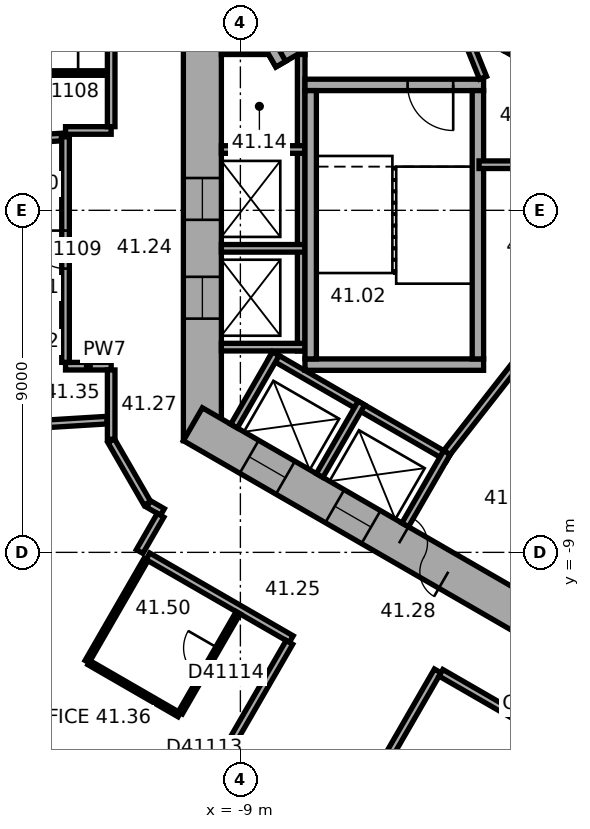
"""IFC4 building model, lengths in metres.
Left out: names, types, materials, properties, quantities, classifications, styles, units other than length and angle.
Written with IfcOpenShell. Run it as: python <this file> out.ifc"""

import sys

from ifc_helpers import new_model, si_unit, direction, frame, frame_2d, origin, place, context, subcontext, project, spatial, rectangle, extrude, element, fill, save


model = new_model("IFC4")
c1 = context("Model", 3, precision=1e-05, world=origin(), true_north=direction((0.0, 1.0)))
c2 = subcontext(c1, "Body", "Model", "MODEL_VIEW")
j1 = project(units=[si_unit("LENGTHUNIT", "METRE"), si_unit("PLANEANGLEUNIT", "RADIAN")], contexts=[c1])
p1 = place(None, origin())
s1 = spatial("IfcSite", under=j1, at=p1, CompositionType="ELEMENT")
p2 = place(p1, origin())
s2 = spatial("IfcBuilding", under=s1, at=p2, CompositionType="ELEMENT")
p3 = place(p2, frame((0.0, 0.0, 168.8)))
s3 = spatial("IfcBuildingStorey", under=s2, at=p3, CompositionType="ELEMENT", Elevation=168.8)
p4 = place(p3, frame((-10.0, 6.062, 0.0), z_axis=(0.0, 0.0, 1.0), x_axis=(0.0, -1.0, 0.0)))
e1 = element("IfcWall", 1, at=p4, inside=s3, PredefinedType="SHEAR", context=c2, shape_type="SweptSolid", body=[
    extrude(rectangle(XDim=12.125, YDim=1.0, at=frame_2d((6.062, 0.0))), origin(), (0.0, 0.0, 1.0), 3.7),
])
p5 = place(p4, frame((5.212, 0.0, 0.0)))
e2 = element("IfcOpeningElement", 2, at=p5, cuts=e1, PredefinedType="OPENING", context=c2, shape_type="SweptSolid", body=[
    extrude(rectangle(XDim=1.1, YDim=2.1, at=frame_2d((0.55, 1.05))), frame((0.0, 0.51, 0.0), z_axis=(0.0, -1.0, 0.0), x_axis=(1.0, 0.0, 0.0)), (0.0, 0.0, 1.0), 1.02),
])
p6 = place(p4, frame((7.812, 0.0, 0.0)))
e3 = element("IfcOpeningElement", 3, at=p6, cuts=e1, PredefinedType="OPENING", context=c2, shape_type="SweptSolid", body=[
    extrude(rectangle(XDim=1.1, YDim=2.1, at=frame_2d((0.55, 1.05))), frame((0.0, 0.51, 0.0), z_axis=(0.0, -1.0, 0.0), x_axis=(1.0, 0.0, 0.0)), (0.0, 0.0, 1.0), 1.02),
])
p7 = place(p3, frame((-10.25, -5.629, 0.0), z_axis=(0.0, 0.0, 1.0), x_axis=(0.866022616891, -0.50000482701, 0.0)))
e4 = element("IfcWall", 4, at=p7, inside=s3, PredefinedType="SHEAR", context=c2, shape_type="SweptSolid", body=[
    extrude(rectangle(XDim=12.125, YDim=1.0, at=frame_2d((6.062, 0.0))), origin(), (0.0, 0.0, 1.0), 3.7),
])
p8 = place(p7, frame((6.262, 0.0, 0.0)))
e5 = element("IfcOpeningElement", 5, at=p8, cuts=e4, PredefinedType="OPENING", context=c2, shape_type="SweptSolid", body=[
    extrude(rectangle(XDim=1.5, YDim=2.1, at=frame_2d((0.75, 1.05))), frame((0.0, 0.51, 0.0), z_axis=(0.0, -1.0, 0.0), x_axis=(1.0, 0.0, 0.0)), (0.0, 0.0, 1.0), 1.02),
])
p9 = place(p7, frame((1.712, 0.0, 0.0)))
e6 = element("IfcOpeningElement", 6, at=p9, cuts=e4, PredefinedType="OPENING", context=c2, shape_type="SweptSolid", body=[
    extrude(rectangle(XDim=1.1, YDim=2.1, at=frame_2d((0.55, 1.05))), frame((0.0, 0.51, 0.0), z_axis=(0.0, -1.0, 0.0), x_axis=(1.0, 0.0, 0.0)), (0.0, 0.0, 1.0), 1.02),
])
p10 = place(p7, frame((4.312, 0.0, 0.0)))
e7 = element("IfcOpeningElement", 7, at=p10, cuts=e4, PredefinedType="OPENING", context=c2, shape_type="SweptSolid", body=[
    extrude(rectangle(XDim=1.1, YDim=2.1, at=frame_2d((0.55, 1.05))), frame((0.0, 0.51, 0.0), z_axis=(0.0, -1.0, 0.0), x_axis=(1.0, 0.0, 0.0)), (0.0, 0.0, 1.0), 1.02),
])
p11 = place(p3, frame((-18.789, -14.267, 0.0), z_axis=(0.0, 0.0, 1.0), x_axis=(0.866023315909, -0.500003616288, 0.0)))
e8 = element("IfcWall", 8, at=p11, inside=s3, PredefinedType="STANDARD", context=c2, shape_type="SweptSolid", body=[
    extrude(rectangle(XDim=20.044, YDim=0.2, at=frame_2d((10.022, 0.0))), origin(), (0.0, 0.0, 1.0), 3.7),
])
p12 = place(p11, frame((1.314, 0.0, 0.9)))
e9 = element("IfcOpeningElement", 9, at=p12, cuts=e8, PredefinedType="OPENING", context=c2, shape_type="SweptSolid", body=[
    extrude(rectangle(XDim=2.4, YDim=2.0, at=frame_2d((1.2, 1.0))), frame((0.0, 0.11, 0.0), z_axis=(0.0, -1.0, 0.0), x_axis=(1.0, 0.0, 0.0)), (0.0, 0.0, 1.0), 0.22),
])
p13 = place(p11, frame((5.069, 0.0, 0.9)))
e10 = element("IfcOpeningElement", 10, at=p13, cuts=e8, PredefinedType="OPENING", context=c2, shape_type="SweptSolid", body=[
    extrude(rectangle(XDim=2.4, YDim=2.0, at=frame_2d((1.2, 1.0))), frame((0.0, 0.11, 0.0), z_axis=(0.0, -1.0, 0.0), x_axis=(1.0, 0.0, 0.0)), (0.0, 0.0, 1.0), 0.22),
])
p14 = place(p11, frame((8.823, 0.0, 0.9)))
e11 = element("IfcOpeningElement", 11, at=p14, cuts=e8, PredefinedType="OPENING", context=c2, shape_type="SweptSolid", body=[
    extrude(rectangle(XDim=2.4, YDim=2.0, at=frame_2d((1.2, 1.0))), frame((0.0, 0.11, 0.0), z_axis=(0.0, -1.0, 0.0), x_axis=(1.0, 0.0, 0.0)), (0.0, 0.0, 1.0), 0.22),
])
p15 = place(p11, frame((12.577, 0.0, 0.9)))
e12 = element("IfcOpeningElement", 12, at=p15, cuts=e8, PredefinedType="OPENING", context=c2, shape_type="SweptSolid", body=[
    extrude(rectangle(XDim=2.4, YDim=2.0, at=frame_2d((1.2, 1.0))), frame((0.0, 0.11, 0.0), z_axis=(0.0, -1.0, 0.0), x_axis=(1.0, 0.0, 0.0)), (0.0, 0.0, 1.0), 0.22),
])
p16 = place(p11, frame((16.331, 0.0, 0.9)))
e13 = element("IfcOpeningElement", 13, at=p16, cuts=e8, PredefinedType="OPENING", context=c2, shape_type="SweptSolid", body=[
    extrude(rectangle(XDim=2.4, YDim=2.0, at=frame_2d((1.2, 1.0))), frame((0.0, 0.11, 0.0), z_axis=(0.0, -1.0, 0.0), x_axis=(1.0, 0.0, 0.0)), (0.0, 0.0, 1.0), 0.22),
])
p17 = place(p3, frame((-7.4, 4.3, 0.0), z_axis=(0.0, 0.0, 1.0), x_axis=(0.0, -1.0, 0.0)))
e14 = element("IfcWall", 14, at=p17, inside=s3, PredefinedType="PARTITIONING", context=c2, shape_type="SweptSolid", body=[
    extrude(rectangle(XDim=8.0, YDim=0.2, at=frame_2d((4.0, 0.0))), origin(), (0.0, 0.0, 1.0), 3.42),
])
for number, where, z_axis, x_axis in (
    (15, (-7.3, 4.2, 0.0), (0.0, 0.0, 1.0), (-1.0, 0.0, 0.0)),
    (16, (-7.3, 1.6, 0.0), (0.0, 0.0, 1.0), (-1.0, 0.0, 0.0)),
    (17, (-7.3, -1.0, 0.0), (0.0, 0.0, 1.0), (-1.0, 0.0, 0.0)),
    (18, (-7.3, -3.6, 0.0), (0.0, 0.0, 1.0), (-1.0, 0.0, 0.0)),
):
    element("IfcWall", number, at=place(p3, frame(where, z_axis=z_axis, x_axis=x_axis)), inside=s3, PredefinedType="PARTITIONING", context=c2, shape_type="SweptSolid", body=[
        extrude(rectangle(XDim=2.2, YDim=0.2, at=frame_2d((1.1, 0.0))), origin(), (0.0, 0.0, 1.0), 3.42),
    ])
p18 = place(p3, frame((-8.203, -3.809, 0.0), z_axis=(0.0, 0.0, 1.0), x_axis=(0.866028230842, -0.499995103361, 0.0)))
e19 = element("IfcWall", 19, at=p18, inside=s3, PredefinedType="PARTITIONING", context=c2, shape_type="SweptSolid", body=[
    extrude(rectangle(XDim=5.4, YDim=0.2, at=frame_2d((2.7, 0.0))), origin(), (0.0, 0.0, 1.0), 3.42),
])
for number, where, z_axis, x_axis in (
    (20, (-8.067, -3.772, 0.0), (0.0, 0.0, 1.0), (-0.5, -0.866, 0.0)),
    (21, (-5.815, -5.072, 0.0), (0.0, 0.0, 1.0), (-0.5, -0.866, 0.0)),
):
    element("IfcWall", number, at=place(p3, frame(where, z_axis=z_axis, x_axis=x_axis)), inside=s3, PredefinedType="PARTITIONING", context=c2, shape_type="SweptSolid", body=[
        extrude(rectangle(XDim=2.2, YDim=0.2, at=frame_2d((1.1, 0.0))), origin(), (0.0, 0.0, 1.0), 3.42),
    ])
p19 = place(p3, frame((-3.563, -6.372, 0.0), z_axis=(0.0, 0.0, 1.0), x_axis=(-0.499994660107, -0.866028486751, 0.0)))
e22 = element("IfcWall", 22, at=p19, inside=s3, PredefinedType="PARTITIONING", context=c2, shape_type="SweptSolid", body=[
    extrude(rectangle(XDim=2.2, YDim=0.2, at=frame_2d((1.1, 0.0))), origin(), (0.0, 0.0, 1.0), 3.42),
])
p20 = place(p3, frame((4.103, 0.807, 0.0), z_axis=(0.0, 0.0, 1.0), x_axis=(-0.866027801685, 0.499995846692, 0.0)))
e23 = element("IfcWall", 23, at=p20, inside=s3, PredefinedType="SHEAR", context=c2, shape_type="SweptSolid", body=[
    extrude(rectangle(XDim=7.06, YDim=0.3, at=frame_2d((3.53, 0.0))), origin(), (0.0, 0.0, 1.0), 3.42),
])
p21 = place(p3, frame((-2.6, 3.3, 0.0), z_axis=(0.0, 0.0, 1.0), x_axis=(-1.0, 0.0, 0.0)))
e24 = element("IfcWall", 24, at=p21, inside=s3, PredefinedType="SHEAR", context=c2, shape_type="SweptSolid", body=[
    extrude(rectangle(XDim=4.7, YDim=0.3, at=frame_2d((2.35, 0.0))), origin(), (0.0, 0.0, 1.0), 3.42),
])
p22 = place(p21, frame((0.8, 0.0, 0.0)))
e25 = element("IfcOpeningElement", 25, at=p22, cuts=e24, PredefinedType="OPENING", context=c2, shape_type="SweptSolid", body=[
    extrude(rectangle(XDim=1.2, YDim=2.1, at=frame_2d((0.6, 1.05))), frame((0.0, 0.16, 0.0), z_axis=(0.0, -1.0, 0.0), x_axis=(1.0, 0.0, 0.0)), (0.0, 0.0, 1.0), 0.32),
])
p23 = place(p3, frame((-2.6, -4.06, 0.0), z_axis=(0.0, 0.0, 1.0), x_axis=(-1.0, 0.0, 0.0)))
e26 = element("IfcWall", 26, at=p23, inside=s3, PredefinedType="SHEAR", context=c2, shape_type="SweptSolid", body=[
    extrude(rectangle(XDim=4.7, YDim=0.3, at=frame_2d((2.35, 0.0))), origin(), (0.0, 0.0, 1.0), 3.42),
])
for number, where, z_axis, x_axis in (
    (27, (-2.75, 3.15, 0.0), (0.0, 0.0, 1.0), (0.0, -1.0, 0.0)),
    (28, (-7.15, 3.15, 0.0), (0.0, 0.0, 1.0), (0.0, -1.0, 0.0)),
):
    element("IfcWall", number, at=place(p3, frame(where, z_axis=z_axis, x_axis=x_axis)), inside=s3, PredefinedType="SHEAR", context=c2, shape_type="SweptSolid", body=[
        extrude(rectangle(XDim=7.06, YDim=0.3, at=frame_2d((3.53, 0.0))), origin(), (0.0, 0.0, 1.0), 3.42),
    ])
p24 = place(p3, frame((-5.24, 5.577, 0.0), z_axis=(0.0, 0.0, 1.0), x_axis=(-0.866014461049, -0.500018952895, 0.0)))
e29 = element("IfcWall", 29, at=p24, inside=s3, PredefinedType="SHEAR", context=c2, shape_type="SweptSolid", body=[
    extrude(rectangle(XDim=3.35, YDim=0.3, at=frame_2d((1.675, 0.0))), origin(), (0.0, 0.0, 1.0), 3.42),
])
p25 = place(p3, frame((-7.937, 3.847, 0.0), z_axis=(0.0, 0.0, 1.0), x_axis=(-0.50002983664, 0.866008176907, 0.0)))
e30 = element("IfcWall", 30, at=p25, inside=s3, PredefinedType="SHEAR", context=c2, shape_type="SweptSolid", body=[
    extrude(rectangle(XDim=2.2, YDim=0.3, at=frame_2d((1.1, 0.0))), origin(), (0.0, 0.0, 1.0), 3.42),
])
p26 = place(p3, frame((-2.615, 3.487, 0.0), z_axis=(0.0, 0.0, 1.0), x_axis=(-0.373576831041, 0.92759924068, 0.0)))
e31 = element("IfcWall", 31, at=p26, inside=s3, PredefinedType="PARTITIONING", context=c2, shape_type="SweptSolid", body=[
    extrude(rectangle(XDim=3.002, YDim=0.2, at=frame_2d((1.501, 0.0))), origin(), (0.0, 0.0, 1.0), 3.42),
])
p27 = place(p26, frame((1.15, 0.0, 0.0)))
e32 = element("IfcOpeningElement", 32, at=p27, cuts=e31, PredefinedType="OPENING", context=c2, shape_type="SweptSolid", body=[
    extrude(rectangle(XDim=0.9, YDim=2.1, at=frame_2d((0.45, 1.05))), frame((0.0, 0.11, 0.0), z_axis=(0.0, -1.0, 0.0), x_axis=(1.0, 0.0, 0.0)), (0.0, 0.0, 1.0), 0.22),
])
p28 = place(p3, frame((-1.712, -4.008, 0.0), z_axis=(0.0, 0.0, 1.0), x_axis=(-0.616549420702, -0.787316208287, 0.0)))
e33 = element("IfcWall", 33, at=p28, inside=s3, PredefinedType="PARTITIONING", context=c2, shape_type="SweptSolid", body=[
    extrude(rectangle(XDim=3.002, YDim=0.2, at=frame_2d((1.501, 0.0))), origin(), (0.0, 0.0, 1.0), 3.42),
])
p29 = place(p3, frame((-2.72, 1.2, 0.0), z_axis=(0.0, 0.0, 1.0), x_axis=(1.0, 0.0, 0.0)))
e34 = element("IfcWall", 34, at=p29, inside=s3, PredefinedType="PARTITIONING", context=c2, shape_type="SweptSolid", body=[
    extrude(rectangle(XDim=5.961, YDim=0.2, at=frame_2d((2.981, 0.0))), origin(), (0.0, 0.0, 1.0), 3.42),
])
p30 = place(p3, frame((-20.88, 1.49, 0.0), z_axis=(0.0, 0.0, 1.0), x_axis=(0.998134881975, 0.061047173439, 0.0)))
e35 = element("IfcWall", 35, at=p30, inside=s3, PredefinedType="PARTITIONING", context=c2, shape_type="SweptSolid", body=[
    extrude(rectangle(XDim=7.183, YDim=0.2, at=frame_2d((3.591, 0.0))), origin(), (0.0, 0.0, 1.0), 2.87),
])
p31 = place(p3, frame((-20.421, -6.005, 0.0), z_axis=(0.0, 0.0, 1.0), x_axis=(0.998134865741, 0.061047438866, 0.0)))
e36 = element("IfcWall", 36, at=p31, inside=s3, PredefinedType="PARTITIONING", context=c2, shape_type="SweptSolid", body=[
    extrude(rectangle(XDim=7.927, YDim=0.2, at=frame_2d((3.963, 0.0))), origin(), (0.0, 0.0, 1.0), 2.87),
])
p32 = place(p3, frame((-13.601, -4.101, 0.0), z_axis=(0.0, 0.0, 1.0), x_axis=(1.0, 0.0, 0.0)))
e37 = element("IfcWall", 37, at=p32, inside=s3, PredefinedType="PARTITIONING", context=c2, shape_type="SweptSolid", body=[
    extrude(rectangle(XDim=1.201, YDim=0.2, at=frame_2d((0.601, 0.0))), origin(), (0.0, 0.0, 1.0), 3.42),
])
p33 = place(p3, frame((-13.601, 1.935, 0.0), z_axis=(0.0, 0.0, 1.0), x_axis=(0.0, -1.0, 0.0)))
e38 = element("IfcWall", 38, at=p33, inside=s3, PredefinedType="PARTITIONING", context=c2, shape_type="SweptSolid", body=[
    extrude(rectangle(XDim=5.936, YDim=0.2, at=frame_2d((2.968, 0.0))), origin(), (0.0, 0.0, 1.0), 3.42),
])
p34 = place(p33, frame((2.468, 0.0, 0.0)))
e39 = element("IfcOpeningElement", 39, at=p34, cuts=e38, PredefinedType="OPENING", context=c2, shape_type="SweptSolid", body=[
    extrude(rectangle(XDim=1.0, YDim=2.1, at=frame_2d((0.5, 1.05))), frame((0.0, 0.11, 0.0), z_axis=(0.0, -1.0, 0.0), x_axis=(1.0, 0.0, 0.0)), (0.0, 0.0, 1.0), 0.22),
])
p35 = place(p3, frame((-13.035, -11.875, 0.0), z_axis=(0.0, 0.0, 1.0), x_axis=(0.500026960575, 0.86600983753, 0.0)))
e40 = element("IfcWall", 40, at=p35, inside=s3, PredefinedType="PARTITIONING", context=c2, shape_type="SweptSolid", body=[
    extrude(rectangle(XDim=3.1, YDim=0.12, at=frame_2d((1.55, 0.0))), origin(), (0.0, 0.0, 1.0), 3.42),
])
p36 = place(p3, frame((-12.5, 3.612, 0.0), z_axis=(0.0, 0.0, 1.0), x_axis=(-1.0, 0.0, 0.0)))
e41 = element("IfcWall", 41, at=p36, inside=s3, PredefinedType="PARTITIONING", context=c2, shape_type="SweptSolid", body=[
    extrude(rectangle(XDim=2.44, YDim=0.12, at=frame_2d((1.22, 0.0))), origin(), (0.0, 0.0, 1.0), 3.42),
])
p37 = place(p36, frame((0.77, 0.0, 0.0)))
e42 = element("IfcOpeningElement", 42, at=p37, cuts=e41, PredefinedType="OPENING", context=c2, shape_type="SweptSolid", body=[
    extrude(rectangle(XDim=0.9, YDim=2.1, at=frame_2d((0.45, 1.05))), frame((0.0, 0.07, 0.0), z_axis=(0.0, -1.0, 0.0), x_axis=(1.0, 0.0, 0.0)), (0.0, 0.0, 1.0), 0.14),
])
p38 = place(p3, frame((-12.4, -6.062, 0.0), z_axis=(0.0, 0.0, 1.0), x_axis=(0.500022797313, -0.86601224135, 0.0)))
e43 = element("IfcWall", 43, at=p38, inside=s3, PredefinedType="PARTITIONING", context=c2, shape_type="SweptSolid", body=[
    extrude(rectangle(XDim=1.9, YDim=0.2, at=frame_2d((0.95, 0.0))), origin(), (0.0, 0.0, 1.0), 3.42),
])
p39 = place(p3, frame((-12.4, -4.201, 0.0), z_axis=(0.0, 0.0, 1.0), x_axis=(0.0, -1.0, 0.0)))
e44 = element("IfcWall", 44, at=p39, inside=s3, PredefinedType="PARTITIONING", context=c2, shape_type="SweptSolid", body=[
    extrude(rectangle(XDim=1.821, YDim=0.2, at=frame_2d((0.911, 0.0))), origin(), (0.0, 0.0, 1.0), 3.42),
])
p40 = place(p3, frame((-12.4, 2.101, 0.0), z_axis=(0.0, 0.0, 1.0), x_axis=(-1.0, 0.0, 0.0)))
e45 = element("IfcWall", 45, at=p40, inside=s3, PredefinedType="PARTITIONING", context=c2, shape_type="SweptSolid", body=[
    extrude(rectangle(XDim=1.201, YDim=0.2, at=frame_2d((0.601, 0.0))), origin(), (0.0, 0.0, 1.0), 3.42),
])
p41 = place(p3, frame((-12.4, 5.812, 0.0), z_axis=(0.0, 0.0, 1.0), x_axis=(0.0, -1.0, 0.0)))
e46 = element("IfcWall", 46, at=p41, inside=s3, PredefinedType="PARTITIONING", context=c2, shape_type="SweptSolid", body=[
    extrude(rectangle(XDim=3.611, YDim=0.2, at=frame_2d((1.806, 0.0))), origin(), (0.0, 0.0, 1.0), 3.42),
])
p42 = place(p3, frame((-11.435, -9.103, 0.0), z_axis=(0.0, 0.0, 1.0), x_axis=(0.866007399799, -0.500031182522, 0.0)))
e47 = element("IfcWall", 47, at=p42, inside=s3, PredefinedType="PARTITIONING", context=c2, shape_type="SweptSolid", body=[
    extrude(rectangle(XDim=4.358, YDim=0.2, at=frame_2d((2.179, 0.0))), origin(), (0.0, 0.0, 1.0), 3.42),
])
p43 = place(p3, frame((-11.415, -7.728, 0.0), z_axis=(0.0, 0.0, 1.0), x_axis=(0.865915281873, -0.500190688257, 0.0)))
e48 = element("IfcWall", 48, at=p43, inside=s3, PredefinedType="PARTITIONING", context=c2, shape_type="SweptSolid", body=[
    extrude(rectangle(XDim=0.421, YDim=0.2, at=frame_2d((0.21, 0.0))), origin(), (0.0, 0.0, 1.0), 3.42),
])
p44 = place(p3, frame((-11.235, -17.474, 0.0), z_axis=(0.0, 0.0, 1.0), x_axis=(0.500009260695, 0.866020057054, 0.0)))
e49 = element("IfcWall", 49, at=p44, inside=s3, PredefinedType="PARTITIONING", context=c2, shape_type="SweptSolid", body=[
    extrude(rectangle(XDim=7.049, YDim=0.2, at=frame_2d((3.524, 0.0))), origin(), (0.0, 0.0, 1.0), 2.87),
])
p45 = place(p44, frame((3.024, 0.0, 0.0)))
e50 = element("IfcOpeningElement", 50, at=p45, cuts=e49, PredefinedType="OPENING", context=c2, shape_type="SweptSolid", body=[
    extrude(rectangle(XDim=1.0, YDim=2.1, at=frame_2d((0.5, 1.05))), frame((0.0, 0.11, 0.0), z_axis=(0.0, -1.0, 0.0), x_axis=(1.0, 0.0, 0.0)), (0.0, 0.0, 1.0), 0.22),
])
p46 = place(p3, frame((-11.101, -8.025, 0.0), z_axis=(0.0, 0.0, 1.0), x_axis=(-0.500074377092, -0.865982457891, 0.0)))
e51 = element("IfcWall", 51, at=p46, inside=s3, PredefinedType="PARTITIONING", context=c2, shape_type="SweptSolid", body=[
    extrude(rectangle(XDim=1.101, YDim=0.2, at=frame_2d((0.55, 0.0))), origin(), (0.0, 0.0, 1.0), 3.42),
])
p47 = place(p3, frame((-10.61, -13.275, 0.0), z_axis=(0.0, 0.0, 1.0), x_axis=(-0.866019409031, 0.500010383074, 0.0)))
e52 = element("IfcWall", 52, at=p47, inside=s3, PredefinedType="PARTITIONING", context=c2, shape_type="SweptSolid", body=[
    extrude(rectangle(XDim=2.74, YDim=0.12, at=frame_2d((1.37, 0.0))), origin(), (0.0, 0.0, 1.0), 3.42),
])
p48 = place(p3, frame((-9.06, -10.59, 0.0), z_axis=(0.0, 0.0, 1.0), x_axis=(-0.49993101378, -0.866065229334, 0.0)))
e53 = element("IfcWall", 53, at=p48, inside=s3, PredefinedType="PARTITIONING", context=c2, shape_type="SweptSolid", body=[
    extrude(rectangle(XDim=3.04, YDim=0.12, at=frame_2d((1.52, 0.0))), origin(), (0.0, 0.0, 1.0), 3.42),
])
p49 = place(p48, frame((1.07, 0.0, 0.0)))
e54 = element("IfcOpeningElement", 54, at=p49, cuts=e53, PredefinedType="OPENING", context=c2, shape_type="SweptSolid", body=[
    extrude(rectangle(XDim=0.9, YDim=2.1, at=frame_2d((0.45, 1.05))), frame((0.0, 0.07, 0.0), z_axis=(0.0, -1.0, 0.0), x_axis=(1.0, 0.0, 0.0)), (0.0, 0.0, 1.0), 0.14),
])
p50 = place(p3, frame((-7.984, -19.351, 0.0), z_axis=(0.0, 0.0, 1.0), x_axis=(0.500010139422, 0.866019549707, 0.0)))
e55 = element("IfcWall", 55, at=p50, inside=s3, PredefinedType="PARTITIONING", context=c2, shape_type="SweptSolid", body=[
    extrude(rectangle(XDim=8.35, YDim=0.2, at=frame_2d((4.175, 0.0))), origin(), (0.0, 0.0, 1.0), 3.42),
])
p51 = place(p50, frame((3.675, 0.0, 0.0)))
e56 = element("IfcOpeningElement", 56, at=p51, cuts=e55, PredefinedType="OPENING", context=c2, shape_type="SweptSolid", body=[
    extrude(rectangle(XDim=1.0, YDim=2.1, at=frame_2d((0.5, 1.05))), frame((0.0, 0.11, 0.0), z_axis=(0.0, -1.0, 0.0), x_axis=(1.0, 0.0, 0.0)), (0.0, 0.0, 1.0), 0.22),
])
p52 = place(p3, frame((-4.732, -21.228, 0.0), z_axis=(0.0, 0.0, 1.0), x_axis=(0.500000843414, 0.866024916838, 0.0)))
e57 = element("IfcWall", 57, at=p52, inside=s3, PredefinedType="PARTITIONING", context=c2, shape_type="SweptSolid", body=[
    extrude(rectangle(XDim=8.452, YDim=0.2, at=frame_2d((4.226, 0.0))), origin(), (0.0, 0.0, 1.0), 3.42),
])
p53 = place(p3, frame((-3.722, -12.169, 0.0), z_axis=(0.0, 0.0, 1.0), x_axis=(0.866033163891, -0.499986558861, 0.0)))
e58 = element("IfcWall", 58, at=p53, inside=s3, PredefinedType="PARTITIONING", context=c2, shape_type="SweptSolid", body=[
    extrude(rectangle(XDim=3.201, YDim=0.2, at=frame_2d((1.6, 0.0))), origin(), (0.0, 0.0, 1.0), 3.42),
])
p54 = place(p8, origin())
e59 = element("IfcDoor", 59, at=p54, inside=s3, OperationType="DOUBLE_DOOR_SINGLE_SWING", PredefinedType="DOOR", context=c2, shape_type="SweptSolid", body=[
    extrude(rectangle(XDim=1.5, YDim=2.1, at=frame_2d((0.75, 1.05))), frame((0.0, 0.025, 0.0), z_axis=(0.0, -1.0, 0.0), x_axis=(1.0, 0.0, 0.0)), (0.0, 0.0, 1.0), 0.05),
])
fill(e5, e59)
p55 = place(p22, origin())
e60 = element("IfcDoor", 60, at=p55, inside=s3, OperationType="SINGLE_SWING_RIGHT", PredefinedType="DOOR", context=c2, shape_type="SweptSolid", body=[
    extrude(rectangle(XDim=1.2, YDim=2.1, at=frame_2d((0.6, 1.05))), frame((0.0, 0.025, 0.0), z_axis=(0.0, -1.0, 0.0), x_axis=(1.0, 0.0, 0.0)), (0.0, 0.0, 1.0), 0.05),
])
fill(e25, e60)
p56 = place(p5, origin())
e61 = element("IfcDoor", 61, at=p56, inside=s3, OperationType="DOUBLE_DOOR_SLIDING", PredefinedType="DOOR", context=c2, shape_type="SweptSolid", body=[
    extrude(rectangle(XDim=1.1, YDim=2.1, at=frame_2d((0.55, 1.05))), frame((0.0, 0.025, 0.0), z_axis=(0.0, -1.0, 0.0), x_axis=(1.0, 0.0, 0.0)), (0.0, 0.0, 1.0), 0.05),
])
fill(e2, e61)
p57 = place(p6, origin())
e62 = element("IfcDoor", 62, at=p57, inside=s3, OperationType="DOUBLE_DOOR_SLIDING", PredefinedType="DOOR", context=c2, shape_type="SweptSolid", body=[
    extrude(rectangle(XDim=1.1, YDim=2.1, at=frame_2d((0.55, 1.05))), frame((0.0, 0.025, 0.0), z_axis=(0.0, -1.0, 0.0), x_axis=(1.0, 0.0, 0.0)), (0.0, 0.0, 1.0), 0.05),
])
fill(e3, e62)
p58 = place(p9, origin())
e63 = element("IfcDoor", 63, at=p58, inside=s3, OperationType="DOUBLE_DOOR_SLIDING", PredefinedType="DOOR", context=c2, shape_type="SweptSolid", body=[
    extrude(rectangle(XDim=1.1, YDim=2.1, at=frame_2d((0.55, 1.05))), frame((0.0, 0.025, 0.0), z_axis=(0.0, -1.0, 0.0), x_axis=(1.0, 0.0, 0.0)), (0.0, 0.0, 1.0), 0.05),
])
fill(e6, e63)
p59 = place(p10, origin())
e64 = element("IfcDoor", 64, at=p59, inside=s3, OperationType="DOUBLE_DOOR_SLIDING", PredefinedType="DOOR", context=c2, shape_type="SweptSolid", body=[
    extrude(rectangle(XDim=1.1, YDim=2.1, at=frame_2d((0.55, 1.05))), frame((0.0, 0.025, 0.0), z_axis=(0.0, -1.0, 0.0), x_axis=(1.0, 0.0, 0.0)), (0.0, 0.0, 1.0), 0.05),
])
fill(e7, e64)
p60 = place(p37, origin())
e65 = element("IfcDoor", 65, at=p60, inside=s3, OperationType="SINGLE_SWING_LEFT", PredefinedType="DOOR", context=c2, shape_type="SweptSolid", body=[
    extrude(rectangle(XDim=0.9, YDim=2.1, at=frame_2d((0.45, 1.05))), frame((0.0, 0.025, 0.0), z_axis=(0.0, -1.0, 0.0), x_axis=(1.0, 0.0, 0.0)), (0.0, 0.0, 1.0), 0.05),
])
fill(e42, e65)
p61 = place(p34, origin())
e66 = element("IfcDoor", 66, at=p61, inside=s3, OperationType="SINGLE_SWING_LEFT", PredefinedType="DOOR", context=c2, shape_type="SweptSolid", body=[
    extrude(rectangle(XDim=1.0, YDim=2.1, at=frame_2d((0.5, 1.05))), frame((0.0, 0.025, 0.0), z_axis=(0.0, -1.0, 0.0), x_axis=(1.0, 0.0, 0.0)), (0.0, 0.0, 1.0), 0.05),
])
fill(e39, e66)
p62 = place(p45, origin())
e67 = element("IfcDoor", 67, at=p62, inside=s3, OperationType="SINGLE_SWING_LEFT", PredefinedType="DOOR", context=c2, shape_type="SweptSolid", body=[
    extrude(rectangle(XDim=1.0, YDim=2.1, at=frame_2d((0.5, 1.05))), frame((0.0, 0.025, 0.0), z_axis=(0.0, -1.0, 0.0), x_axis=(1.0, 0.0, 0.0)), (0.0, 0.0, 1.0), 0.05),
])
fill(e50, e67)
p63 = place(p49, origin())
e68 = element("IfcDoor", 68, at=p63, inside=s3, OperationType="SINGLE_SWING_LEFT", PredefinedType="DOOR", context=c2, shape_type="SweptSolid", body=[
    extrude(rectangle(XDim=0.9, YDim=2.1, at=frame_2d((0.45, 1.05))), frame((0.0, 0.025, 0.0), z_axis=(0.0, -1.0, 0.0), x_axis=(1.0, 0.0, 0.0)), (0.0, 0.0, 1.0), 0.05),
])
fill(e54, e68)
save(model, sys.argv[1])
